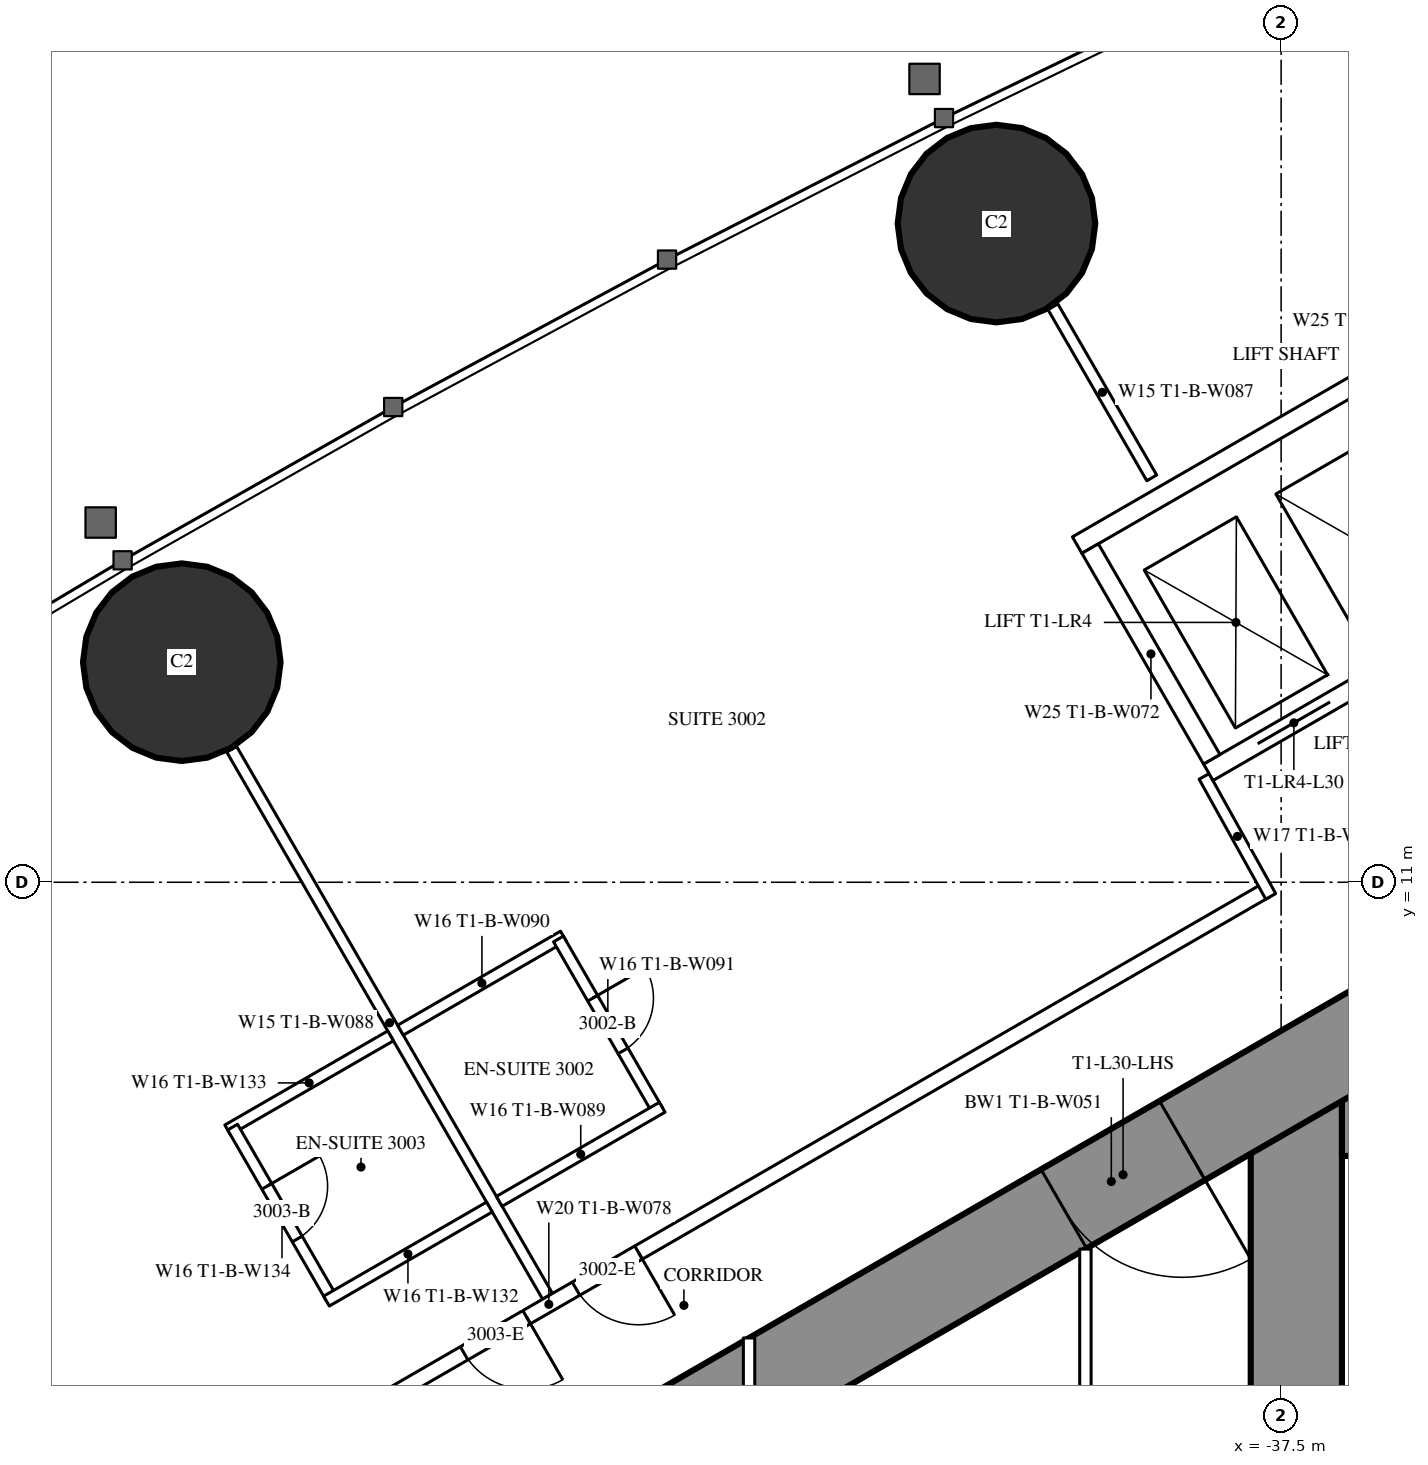
"""IFC4 building model, lengths in metres.
Left out: names, types, materials, properties, quantities, classifications, styles, units other than length and angle.
Written with IfcOpenShell. Run it as: python <this file> out.ifc"""

import sys

from ifc_helpers import new_model, si_unit, direction, frame, frame_2d, origin, origin_2d, place, context, subcontext, project, spatial, rectangle, hollow_circle, extrude, element, fill, save


model = new_model("IFC4")
c1 = context("Model", 3, precision=1e-05, world=origin(), true_north=direction((0.0, 1.0)))
c2 = subcontext(c1, "Body", "Model", "MODEL_VIEW")
j1 = project(units=[si_unit("LENGTHUNIT", "METRE"), si_unit("PLANEANGLEUNIT", "RADIAN")], contexts=[c1])
p1 = place(None, origin())
s1 = spatial("IfcSite", under=j1, at=p1, CompositionType="ELEMENT")
p2 = place(p1, origin())
s2 = spatial("IfcBuilding", under=s1, at=p2, CompositionType="ELEMENT")
p3 = place(p2, frame((0.0, 0.0, 115.1)))
s3 = spatial("IfcBuildingStorey", under=s2, at=p3, CompositionType="ELEMENT", Elevation=115.1)
for number, where, z_axis, x_axis in (
    (1, (-41.245, 19.666, 0.0), (0.0, 0.0, 1.0), (1.0, 0.0, 0.0)),
    (2, (-51.963, 13.895, 0.0), (0.0, 0.0, 1.0), (1.0, 0.0, 0.0)),
):
    element("IfcColumn", number, at=place(p3, frame(where, z_axis=z_axis, x_axis=x_axis)), inside=s3, PredefinedType="COLUMN", context=c2, shape_type="SweptSolid", body=[
        extrude(hollow_circle(Radius=1.3, WallThickness=0.1, at=origin_2d()), origin(), (0.0, 0.0, 1.0), 3.5),
    ])
p4 = place(p3, frame((-37.3, 8.6, 0.0), z_axis=(0.0, 0.0, 1.0), x_axis=(0.0, -1.0, 0.0)))
e3 = element("IfcWall", 3, at=p4, inside=s3, PredefinedType="SHEAR", context=c2, shape_type="SweptSolid", body=[
    extrude(rectangle(XDim=17.2, YDim=1.2, at=frame_2d((8.6, 0.0))), origin(), (0.0, 0.0, 1.0), 3.5),
])
p5 = place(p4, frame((7.7, 0.0, 0.0)))
e4 = element("IfcOpeningElement", 4, at=p5, cuts=e3, PredefinedType="OPENING", context=c2, shape_type="SweptSolid", body=[
    extrude(rectangle(XDim=1.8, YDim=2.2, at=frame_2d((0.9, 1.1))), frame((0.0, 0.61, 0.0), z_axis=(0.0, -1.0, 0.0), x_axis=(1.0, 0.0, 0.0)), (0.0, 0.0, 1.0), 1.22),
])
p6 = place(p3, frame((-28.3, 8.0, 0.0), z_axis=(0.0, 0.0, 1.0), x_axis=(-1.0, 0.0, 0.0)))
e5 = element("IfcWall", 5, at=p6, inside=s3, PredefinedType="SHEAR", context=c2, shape_type="SweptSolid", body=[
    extrude(rectangle(XDim=8.4, YDim=1.2, at=frame_2d((4.2, 0.0))), origin(), (0.0, 0.0, 1.0), 3.5),
])
p7 = place(p6, frame((0.25, 0.0, 0.0)))
e6 = element("IfcOpeningElement", 6, at=p7, cuts=e5, PredefinedType="OPENING", context=c2, shape_type="SweptSolid", body=[
    extrude(rectangle(XDim=1.0, YDim=2.2, at=frame_2d((0.5, 1.1))), frame((0.0, 0.61, 0.0), z_axis=(0.0, -1.0, 0.0), x_axis=(1.0, 0.0, 0.0)), (0.0, 0.0, 1.0), 1.22),
])
p8 = place(p3, frame((-27.2, 14.3, 0.0), z_axis=(0.0, 0.0, 1.0), x_axis=(-0.866026593062, -0.499997940104, 0.0)))
e7 = element("IfcWall", 7, at=p8, inside=s3, PredefinedType="SHEAR", context=c2, shape_type="SweptSolid", body=[
    extrude(rectangle(XDim=28.946, YDim=1.2, at=frame_2d((14.473, 0.0))), origin(), (0.0, 0.0, 1.0), 3.5),
])
p9 = place(p8, frame((4.6, 0.0, 0.0)))
e8 = element("IfcOpeningElement", 8, at=p9, cuts=e7, PredefinedType="OPENING", context=c2, shape_type="SweptSolid", body=[
    extrude(rectangle(XDim=1.0, YDim=2.2, at=frame_2d((0.5, 1.1))), frame((0.0, 0.61, 0.0), z_axis=(0.0, -1.0, 0.0), x_axis=(1.0, 0.0, 0.0)), (0.0, 0.0, 1.0), 1.22),
])
p10 = place(p8, frame((13.395, 0.0, 0.0)))
e9 = element("IfcOpeningElement", 9, at=p10, cuts=e7, PredefinedType="OPENING", context=c2, shape_type="SweptSolid", body=[
    extrude(rectangle(XDim=1.8, YDim=2.2, at=frame_2d((0.9, 1.1))), frame((0.0, 0.61, 0.0), z_axis=(0.0, -1.0, 0.0), x_axis=(1.0, 0.0, 0.0)), (0.0, 0.0, 1.0), 1.22),
])
p11 = place(p3, frame((-47.151, 5.552, 0.0), z_axis=(0.0, 0.0, 1.0), x_axis=(-0.500003012045, 0.866023664773, 0.0)))
e10 = element("IfcWall", 10, at=p11, inside=s3, PredefinedType="PARTITIONING", context=c2, shape_type="SweptSolid", body=[
    extrude(rectangle(XDim=8.311, YDim=0.15, at=frame_2d((4.156, 0.0))), origin(), (0.0, 0.0, 1.0), 2.2),
])
p12 = place(p3, frame((-39.202, 16.32, 0.0), z_axis=(0.0, 0.0, 1.0), x_axis=(-0.499947391036, 0.866055775454, 0.0)))
e11 = element("IfcWall", 11, at=p12, inside=s3, PredefinedType="PARTITIONING", context=c2, shape_type="SweptSolid", body=[
    extrude(rectangle(XDim=2.599, YDim=0.15, at=frame_2d((1.3, 0.0))), origin(), (0.0, 0.0, 1.0), 3.25),
])
p13 = place(p3, frame((-37.7, 10.894, 0.0), z_axis=(0.0, 0.0, 1.0), x_axis=(-0.866027905338, -0.499995667157, 0.0)))
e12 = element("IfcWall", 12, at=p13, inside=s3, PredefinedType="PARTITIONING", context=c2, shape_type="SweptSolid", body=[
    extrude(rectangle(XDim=21.787, YDim=0.2, at=frame_2d((10.894, 0.0))), origin(), (0.0, 0.0, 1.0), 3.25),
])
p14 = place(p13, frame((11.23, 0.0, 0.0)))
e13 = element("IfcOpeningElement", 13, at=p14, cuts=e12, PredefinedType="OPENING", context=c2, shape_type="SweptSolid", body=[
    extrude(rectangle(XDim=0.95, YDim=2.2, at=frame_2d((0.475, 1.1))), frame((0.0, 0.11, 0.0), z_axis=(0.0, -1.0, 0.0), x_axis=(1.0, 0.0, 0.0)), (0.0, 0.0, 1.0), 0.22),
])
p15 = place(p13, frame((9.531, 0.0, 0.0)))
e14 = element("IfcOpeningElement", 14, at=p15, cuts=e12, PredefinedType="OPENING", context=c2, shape_type="SweptSolid", body=[
    extrude(rectangle(XDim=0.95, YDim=2.2, at=frame_2d((0.475, 1.1))), frame((0.0, 0.11, 0.0), z_axis=(0.0, -1.0, 0.0), x_axis=(1.0, 0.0, 0.0)), (0.0, 0.0, 1.0), 0.22),
])
p16 = place(p3, frame((-38.513, 12.392, 0.0), z_axis=(0.0, 0.0, 1.0), x_axis=(0.485585508183, -0.874189175317, 0.0)))
e15 = element("IfcWall", 15, at=p16, inside=s3, PredefinedType="PARTITIONING", context=c2, shape_type="SweptSolid", body=[
    extrude(rectangle(XDim=1.805, YDim=0.15, at=frame_2d((0.902, 0.0))), origin(), (0.0, 0.0, 1.0), 3.25),
])
p17 = place(p3, frame((-49.216, 8.979, 0.0), z_axis=(0.0, 0.0, 1.0), x_axis=(-0.866031185235, -0.4999899861, 0.0)))
e16 = element("IfcWall", 16, at=p17, inside=s3, PredefinedType="PARTITIONING", context=c2, shape_type="SweptSolid", body=[
    extrude(rectangle(XDim=2.475, YDim=0.15, at=frame_2d((1.238, 0.0))), origin(), (0.0, 0.0, 1.0), 3.25),
])
p18 = place(p3, frame((-49.995, 5.527, 0.0), z_axis=(0.0, 0.0, 1.0), x_axis=(-0.500006934395, 0.866021400173, 0.0)))
e17 = element("IfcWall", 17, at=p18, inside=s3, PredefinedType="PARTITIONING", context=c2, shape_type="SweptSolid", body=[
    extrude(rectangle(XDim=2.6, YDim=0.15, at=frame_2d((1.3, 0.0))), origin(), (0.0, 0.0, 1.0), 3.25),
])
p19 = place(p18, frame((0.9, 0.0, 0.0)))
e18 = element("IfcOpeningElement", 18, at=p19, cuts=e17, PredefinedType="OPENING", context=c2, shape_type="SweptSolid", body=[
    extrude(rectangle(XDim=0.8, YDim=2.2, at=frame_2d((0.4, 1.1))), frame((0.0, 0.085, 0.0), z_axis=(0.0, -1.0, 0.0), x_axis=(1.0, 0.0, 0.0)), (0.0, 0.0, 1.0), 0.17),
])
p20 = place(p3, frame((-47.916, 6.727, 0.0), z_axis=(0.0, 0.0, 1.0), x_axis=(-0.866031185235, -0.4999899861, 0.0)))
e19 = element("IfcWall", 19, at=p20, inside=s3, PredefinedType="PARTITIONING", context=c2, shape_type="SweptSolid", body=[
    extrude(rectangle(XDim=2.475, YDim=0.15, at=frame_2d((1.238, 0.0))), origin(), (0.0, 0.0, 1.0), 3.25),
])
p21 = place(p3, frame((-46.943, 10.292, 0.0), z_axis=(0.0, 0.0, 1.0), x_axis=(-0.866006523861, -0.500032699561, 0.0)))
e20 = element("IfcWall", 20, at=p21, inside=s3, PredefinedType="PARTITIONING", context=c2, shape_type="SweptSolid", body=[
    extrude(rectangle(XDim=2.475, YDim=0.15, at=frame_2d((1.237, 0.0))), origin(), (0.0, 0.0, 1.0), 3.25),
])
p22 = place(p3, frame((-45.708, 8.002, 0.0), z_axis=(0.0, 0.0, 1.0), x_axis=(-0.500047596559, 0.865997922154, 0.0)))
e21 = element("IfcWall", 21, at=p22, inside=s3, PredefinedType="PARTITIONING", context=c2, shape_type="SweptSolid", body=[
    extrude(rectangle(XDim=2.6, YDim=0.15, at=frame_2d((1.3, 0.0))), origin(), (0.0, 0.0, 1.0), 3.25),
])
p23 = place(p22, frame((0.9, 0.0, 0.0)))
e22 = element("IfcOpeningElement", 22, at=p23, cuts=e21, PredefinedType="OPENING", context=c2, shape_type="SweptSolid", body=[
    extrude(rectangle(XDim=0.8, YDim=2.2, at=frame_2d((0.4, 1.1))), frame((0.0, 0.085, 0.0), z_axis=(0.0, -1.0, 0.0), x_axis=(1.0, 0.0, 0.0)), (0.0, 0.0, 1.0), 0.17),
])
p24 = place(p3, frame((-45.643, 8.04, 0.0), z_axis=(0.0, 0.0, 1.0), x_axis=(-0.866006523861, -0.500032699561, 0.0)))
e23 = element("IfcWall", 23, at=p24, inside=s3, PredefinedType="PARTITIONING", context=c2, shape_type="SweptSolid", body=[
    extrude(rectangle(XDim=2.475, YDim=0.15, at=frame_2d((1.237, 0.0))), origin(), (0.0, 0.0, 1.0), 3.25),
])
p25 = place(p3, frame((-40.075, 6.174, 0.0), z_axis=(0.0, 0.0, 1.0), x_axis=(0.0, -1.0, 0.0)))
e24 = element("IfcWall", 24, at=p25, inside=s3, PredefinedType="PARTITIONING", context=c2, shape_type="SweptSolid", body=[
    extrude(rectangle(XDim=7.374, YDim=0.15, at=frame_2d((3.687, 0.0))), origin(), (0.0, 0.0, 1.0), 3.25),
])
p26 = place(p25, frame((2.787, 0.0, 0.0)))
e25 = element("IfcOpeningElement", 25, at=p26, cuts=e24, PredefinedType="OPENING", context=c2, shape_type="SweptSolid", body=[
    extrude(rectangle(XDim=1.8, YDim=2.2, at=frame_2d((0.9, 1.1))), frame((0.0, 0.085, 0.0), z_axis=(0.0, -1.0, 0.0), x_axis=(1.0, 0.0, 0.0)), (0.0, 0.0, 1.0), 0.17),
])
p27 = place(p3, frame((-44.5, 5.005, 0.0), z_axis=(0.0, 0.0, 1.0), x_axis=(0.0, -1.0, 0.0)))
e26 = element("IfcWall", 26, at=p27, inside=s3, PredefinedType="PARTITIONING", context=c2, shape_type="SweptSolid", body=[
    extrude(rectangle(XDim=10.009, YDim=0.15, at=frame_2d((5.005, 0.0))), origin(), (0.0, 0.0, 1.0), 2.45),
])
p28 = place(p27, frame((2.002, 0.0, 0.0)))
e27 = element("IfcOpeningElement", 27, at=p28, cuts=e26, PredefinedType="OPENING", context=c2, shape_type="SweptSolid", body=[
    extrude(rectangle(XDim=1.0, YDim=2.2, at=frame_2d((0.5, 1.1))), frame((0.0, 0.085, 0.0), z_axis=(0.0, -1.0, 0.0), x_axis=(1.0, 0.0, 0.0)), (0.0, 0.0, 1.0), 0.17),
])
p29 = place(p27, frame((7.007, 0.0, 0.0)))
e28 = element("IfcOpeningElement", 28, at=p29, cuts=e26, PredefinedType="OPENING", context=c2, shape_type="SweptSolid", body=[
    extrude(rectangle(XDim=1.0, YDim=2.2, at=frame_2d((0.5, 1.1))), frame((0.0, 0.085, 0.0), z_axis=(0.0, -1.0, 0.0), x_axis=(1.0, 0.0, 0.0)), (0.0, 0.0, 1.0), 0.17),
])
p30 = place(p3, frame((-31.01, 16.747, 0.0), z_axis=(0.0, 0.0, 1.0), x_axis=(-0.866028165386, -0.499995216735, 0.0)))
e29 = element("IfcWall", 29, at=p30, inside=s3, PredefinedType="PARTITIONING", context=c2, shape_type="SweptSolid", body=[
    extrude(rectangle(XDim=8.6, YDim=0.25, at=frame_2d((4.3, 0.0))), origin(), (0.0, 0.0, 1.0), 3.25),
])
p31 = place(p30, frame((0.75, 0.0, 0.0)))
e30 = element("IfcOpeningElement", 30, at=p31, cuts=e29, PredefinedType="OPENING", context=c2, shape_type="SweptSolid", body=[
    extrude(rectangle(XDim=1.1, YDim=2.2, at=frame_2d((0.55, 1.1))), frame((0.0, 0.135, 0.0), z_axis=(0.0, -1.0, 0.0), x_axis=(1.0, 0.0, 0.0)), (0.0, 0.0, 1.0), 0.27),
])
p32 = place(p30, frame((2.75, 0.0, 0.0)))
e31 = element("IfcOpeningElement", 31, at=p32, cuts=e29, PredefinedType="OPENING", context=c2, shape_type="SweptSolid", body=[
    extrude(rectangle(XDim=1.1, YDim=2.2, at=frame_2d((0.55, 1.1))), frame((0.0, 0.135, 0.0), z_axis=(0.0, -1.0, 0.0), x_axis=(1.0, 0.0, 0.0)), (0.0, 0.0, 1.0), 0.27),
])
p33 = place(p30, frame((4.75, 0.0, 0.0)))
e32 = element("IfcOpeningElement", 32, at=p33, cuts=e29, PredefinedType="OPENING", context=c2, shape_type="SweptSolid", body=[
    extrude(rectangle(XDim=1.1, YDim=2.2, at=frame_2d((0.55, 1.1))), frame((0.0, 0.135, 0.0), z_axis=(0.0, -1.0, 0.0), x_axis=(1.0, 0.0, 0.0)), (0.0, 0.0, 1.0), 0.27),
])
p34 = place(p30, frame((6.75, 0.0, 0.0)))
e33 = element("IfcOpeningElement", 33, at=p34, cuts=e29, PredefinedType="OPENING", context=c2, shape_type="SweptSolid", body=[
    extrude(rectangle(XDim=1.1, YDim=2.2, at=frame_2d((0.55, 1.1))), frame((0.0, 0.135, 0.0), z_axis=(0.0, -1.0, 0.0), x_axis=(1.0, 0.0, 0.0)), (0.0, 0.0, 1.0), 0.27),
])
p35 = place(p3, frame((-32.736, 19.736, 0.0), z_axis=(0.0, 0.0, 1.0), x_axis=(-0.866028165386, -0.499995216735, 0.0)))
e34 = element("IfcWall", 34, at=p35, inside=s3, PredefinedType="PARTITIONING", context=c2, shape_type="SweptSolid", body=[
    extrude(rectangle(XDim=8.6, YDim=0.25, at=frame_2d((4.3, 0.0))), origin(), (0.0, 0.0, 1.0), 3.25),
])
p36 = place(p3, frame((-38.413, 12.618, 0.0), z_axis=(0.0, 0.0, 1.0), x_axis=(-0.499872130319, 0.866099216793, 0.0)))
e35 = element("IfcWall", 35, at=p36, inside=s3, PredefinedType="PARTITIONING", context=c2, shape_type="SweptSolid", body=[
    extrude(rectangle(XDim=3.2, YDim=0.25, at=frame_2d((1.6, 0.0))), origin(), (0.0, 0.0, 1.0), 3.25),
])
p37 = place(p19, origin())
e36 = element("IfcDoor", 36, at=p37, inside=s3, OperationType="SINGLE_SWING_RIGHT", PredefinedType="DOOR", context=c2, shape_type="SweptSolid", body=[
    extrude(rectangle(XDim=0.8, YDim=2.2, at=frame_2d((0.4, 1.1))), frame((0.0, 0.025, 0.0), z_axis=(0.0, -1.0, 0.0), x_axis=(1.0, 0.0, 0.0)), (0.0, 0.0, 1.0), 0.05),
])
fill(e18, e36)
p38 = place(p14, origin())
e37 = element("IfcDoor", 37, at=p38, inside=s3, OperationType="SINGLE_SWING_LEFT", PredefinedType="DOOR", context=c2, shape_type="SweptSolid", body=[
    extrude(rectangle(XDim=0.95, YDim=2.2, at=frame_2d((0.475, 1.1))), frame((0.0, 0.025, 0.0), z_axis=(0.0, -1.0, 0.0), x_axis=(1.0, 0.0, 0.0)), (0.0, 0.0, 1.0), 0.05),
])
fill(e13, e37)
p39 = place(p23, origin())
e38 = element("IfcDoor", 38, at=p39, inside=s3, OperationType="SINGLE_SWING_RIGHT", PredefinedType="DOOR", context=c2, shape_type="SweptSolid", body=[
    extrude(rectangle(XDim=0.8, YDim=2.2, at=frame_2d((0.4, 1.1))), frame((0.0, 0.025, 0.0), z_axis=(0.0, -1.0, 0.0), x_axis=(1.0, 0.0, 0.0)), (0.0, 0.0, 1.0), 0.05),
])
fill(e22, e38)
p40 = place(p15, origin())
e39 = element("IfcDoor", 39, at=p40, inside=s3, OperationType="SINGLE_SWING_LEFT", PredefinedType="DOOR", context=c2, shape_type="SweptSolid", body=[
    extrude(rectangle(XDim=0.95, YDim=2.2, at=frame_2d((0.475, 1.1))), frame((0.0, 0.025, 0.0), z_axis=(0.0, -1.0, 0.0), x_axis=(1.0, 0.0, 0.0)), (0.0, 0.0, 1.0), 0.05),
])
fill(e14, e39)
p41 = place(p10, origin())
e40 = element("IfcDoor", 40, at=p41, inside=s3, OperationType="DOUBLE_DOOR_SINGLE_SWING", PredefinedType="DOOR", context=c2, shape_type="SweptSolid", body=[
    extrude(rectangle(XDim=1.8, YDim=2.2, at=frame_2d((0.9, 1.1))), frame((0.0, 0.025, 0.0), z_axis=(0.0, -1.0, 0.0), x_axis=(1.0, 0.0, 0.0)), (0.0, 0.0, 1.0), 0.05),
])
fill(e9, e40)
p42 = place(p34, origin())
e41 = element("IfcDoor", 41, at=p42, inside=s3, OperationType="DOUBLE_DOOR_SLIDING", PredefinedType="USERDEFINED", context=c2, shape_type="SweptSolid", body=[
    extrude(rectangle(XDim=1.1, YDim=2.2, at=frame_2d((0.55, 1.1))), frame((0.0, 0.025, 0.0), z_axis=(0.0, -1.0, 0.0), x_axis=(1.0, 0.0, 0.0)), (0.0, 0.0, 1.0), 0.05),
])
fill(e33, e41)
save(model, sys.argv[1])
